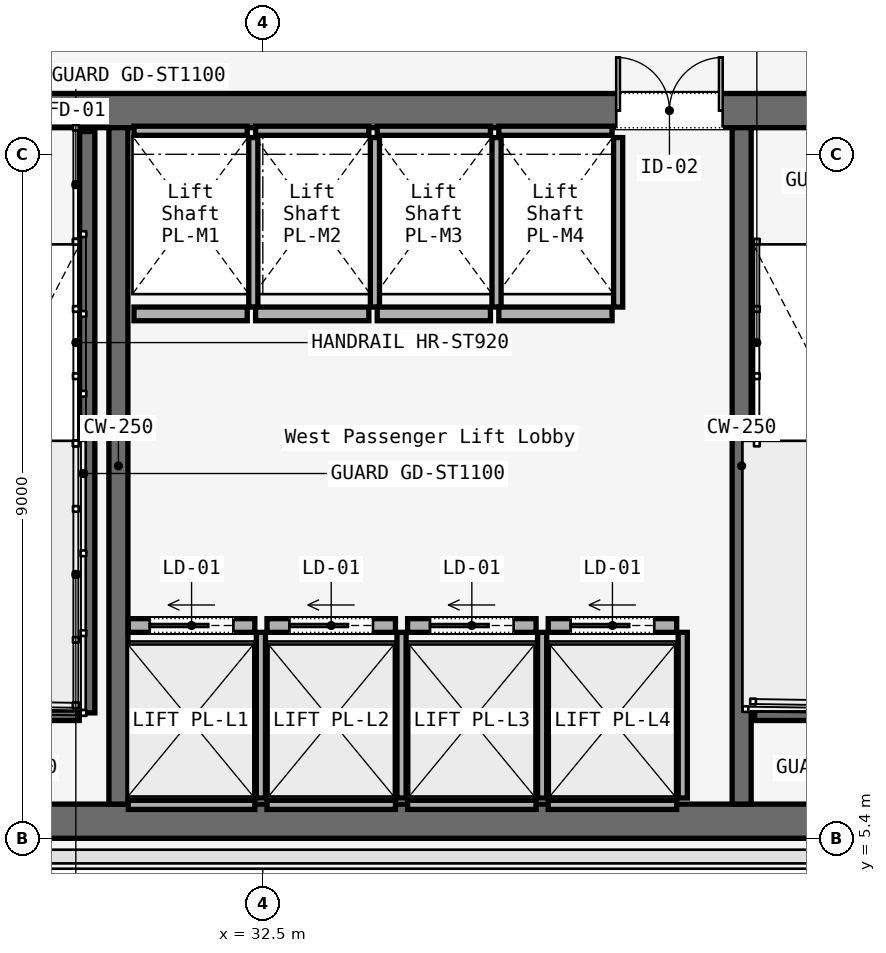
"""IFC4 building model, lengths in metres.
Left out: names, types, materials, properties, quantities, classifications, styles, units other than length and angle.
Written with IfcOpenShell. Run it as: python <this file> out.ifc"""

import sys

from ifc_helpers import new_model, si_unit, direction, frame, frame_2d, origin, place, context, subcontext, project, spatial, rectangle, extrude, element, fill, save


model = new_model("IFC4")
c1 = context("Model", 3, precision=1e-05, world=origin(), true_north=direction((0.0, 1.0)))
c2 = subcontext(c1, "Body", "Model", "MODEL_VIEW")
j1 = project(units=[si_unit("LENGTHUNIT", "METRE"), si_unit("PLANEANGLEUNIT", "RADIAN")], contexts=[c1])
p1 = place(None, origin())
s1 = spatial("IfcSite", under=j1, at=p1, CompositionType="ELEMENT")
p2 = place(p1, origin())
s2 = spatial("IfcBuilding", under=s1, at=p2, CompositionType="ELEMENT")
p3 = place(p2, frame((0.0, 0.0, 62.6)))
s3 = spatial("IfcBuildingStorey", under=s2, at=p3, CompositionType="ELEMENT", Elevation=62.6)
p4 = place(p3, frame((26.45, 14.975, 0.0), z_axis=(0.0, 0.0, 1.0), x_axis=(1.0, 0.0, 0.0)))
e1 = element("IfcWall", 1, at=p4, inside=s3, PredefinedType="SOLIDWALL", context=c2, shape_type="SweptSolid", body=[
    extrude(rectangle(XDim=31.1, YDim=0.45, at=frame_2d((15.55, 0.0))), origin(), (0.0, 0.0, 1.0), 3.58),
])
p5 = place(p4, frame((1.65, 0.0, 0.0)))
e2 = element("IfcOpeningElement", 2, at=p5, cuts=e1, PredefinedType="OPENING", context=c2, shape_type="SweptSolid", body=[
    extrude(rectangle(XDim=1.1, YDim=2.2, at=frame_2d((0.55, 1.1))), frame((0.0, 0.225, 0.0), z_axis=(0.0, -1.0, 0.0), x_axis=(1.0, 0.0, 0.0)), (0.0, 0.0, 1.0), 0.45),
])
p6 = place(p4, frame((13.65, 0.0, 0.0)))
e3 = element("IfcOpeningElement", 3, at=p6, cuts=e1, PredefinedType="OPENING", context=c2, shape_type="SweptSolid", body=[
    extrude(rectangle(XDim=1.1, YDim=2.2, at=frame_2d((0.55, 1.1))), frame((0.0, 0.225, 0.0), z_axis=(0.0, -1.0, 0.0), x_axis=(1.0, 0.0, 0.0)), (0.0, 0.0, 1.0), 0.45),
])
p7 = place(p4, frame((25.55, 0.0, 0.0)))
e4 = element("IfcOpeningElement", 4, at=p7, cuts=e1, PredefinedType="OPENING", context=c2, shape_type="SweptSolid", body=[
    extrude(rectangle(XDim=1.1, YDim=2.2, at=frame_2d((0.55, 1.1))), frame((0.0, 0.225, 0.0), z_axis=(0.0, -1.0, 0.0), x_axis=(1.0, 0.0, 0.0)), (0.0, 0.0, 1.0), 0.45),
])
p8 = place(p4, frame((10.7, 0.0, 0.0)))
e5 = element("IfcOpeningElement", 5, at=p8, cuts=e1, PredefinedType="OPENING", context=c2, shape_type="SweptSolid", body=[
    extrude(rectangle(XDim=1.4, YDim=2.2, at=frame_2d((0.7, 1.1))), frame((0.0, 0.225, 0.0), z_axis=(0.0, -1.0, 0.0), x_axis=(1.0, 0.0, 0.0)), (0.0, 0.0, 1.0), 0.45),
])
p9 = place(p4, frame((19.35, 0.0, 0.0)))
e6 = element("IfcOpeningElement", 6, at=p9, cuts=e1, PredefinedType="OPENING", context=c2, shape_type="SweptSolid", body=[
    extrude(rectangle(XDim=1.1, YDim=2.2, at=frame_2d((0.55, 1.1))), frame((0.0, 0.225, 0.0), z_axis=(0.0, -1.0, 0.0), x_axis=(1.0, 0.0, 0.0)), (0.0, 0.0, 1.0), 0.45),
])
p10 = place(p4, frame((21.4, 0.0, 0.0)))
e7 = element("IfcOpeningElement", 7, at=p10, cuts=e1, PredefinedType="OPENING", context=c2, shape_type="SweptSolid", body=[
    extrude(rectangle(XDim=0.9, YDim=2.1, at=frame_2d((0.45, 1.05))), frame((0.0, 0.225, 0.0), z_axis=(0.0, -1.0, 0.0), x_axis=(1.0, 0.0, 0.0)), (0.0, 0.0, 1.0), 0.45),
])
p11 = place(p4, frame((23.35, 0.0, 0.0)))
e8 = element("IfcOpeningElement", 8, at=p11, cuts=e1, PredefinedType="OPENING", context=c2, shape_type="SweptSolid", body=[
    extrude(rectangle(XDim=1.3, YDim=2.3, at=frame_2d((0.65, 1.15))), frame((0.0, 0.225, 0.0), z_axis=(0.0, -1.0, 0.0), x_axis=(1.0, 0.0, 0.0)), (0.0, 0.0, 1.0), 0.45),
])
p12 = place(p3, frame((26.45, 5.625, 0.0), z_axis=(0.0, 0.0, 1.0), x_axis=(1.0, 0.0, 0.0)))
e9 = element("IfcWall", 9, at=p12, inside=s3, PredefinedType="SOLIDWALL", context=c2, shape_type="SweptSolid", body=[
    extrude(rectangle(XDim=31.1, YDim=0.45, at=frame_2d((15.55, 0.0))), origin(), (0.0, 0.0, 1.0), 3.58),
])
for number, where, z_axis, x_axis in (
    (10, (30.6, 5.85, 0.0), (0.0, 0.0, 1.0), (0.0, 1.0, 0.0)),
    (11, (38.8, 5.85, 0.0), (0.0, 0.0, 1.0), (0.0, 1.0, 0.0)),
):
    element("IfcWall", number, at=place(p3, frame(where, z_axis=z_axis, x_axis=x_axis)), inside=s3, PredefinedType="SOLIDWALL", context=c2, shape_type="SweptSolid", body=[
        extrude(rectangle(XDim=8.9, YDim=0.25, at=frame_2d((4.45, 0.0))), origin(), (0.0, 0.0, 1.0), 3.58),
    ])
p13 = place(p3, frame((30.19, 14.7, 0.0), z_axis=(0.0, 0.0, 1.0), x_axis=(0.0, -1.0, 0.0)))
e12 = element("IfcWall", 12, at=p13, inside=s3, PredefinedType="SOLIDWALL", context=c2, shape_type="SweptSolid", body=[
    extrude(rectangle(XDim=7.65, YDim=0.2, at=frame_2d((3.825, 0.0))), origin(), (0.0, 0.0, 1.0), 3.8),
])
for number, where, z_axis, x_axis in (
    (13, (26.97, 7.05, 0.0), (0.0, 0.0, 1.0), (1.0, 0.0, 0.0)),
    (14, (38.97, 7.05, 0.0), (0.0, 0.0, 1.0), (1.0, 0.0, 0.0)),
):
    element("IfcWall", number, at=place(p3, frame(where, z_axis=z_axis, x_axis=x_axis)), inside=s3, PredefinedType="SOLIDWALL", context=c2, shape_type="SweptSolid", body=[
        extrude(rectangle(XDim=3.115, YDim=0.2, at=frame_2d((1.558, 0.0))), origin(), (0.0, 0.0, 1.0), 3.8),
    ])
p14 = place(p3, frame((30.73, 8.2, 0.0), z_axis=(0.0, 0.0, 1.0), x_axis=(1.0, 0.0, 0.0)))
e15 = element("IfcWall", 15, at=p14, inside=s3, PredefinedType="SOLIDWALL", context=c2, shape_type="SweptSolid", body=[
    extrude(rectangle(XDim=1.665, YDim=0.18, at=frame_2d((0.833, 0.0))), origin(), (0.0, 0.0, 1.0), 2.933),
])
p15 = place(p14, frame((0.282, 0.0, 0.0)))
e16 = element("IfcOpeningElement", 16, at=p15, cuts=e15, PredefinedType="OPENING", context=c2, shape_type="SweptSolid", body=[
    extrude(rectangle(XDim=1.1, YDim=2.2, at=frame_2d((0.55, 1.1))), frame((0.0, 0.09, 0.0), z_axis=(0.0, -1.0, 0.0), x_axis=(1.0, 0.0, 0.0)), (0.0, 0.0, 1.0), 0.18),
])
p16 = place(p3, frame((30.73, 5.84, 0.0), z_axis=(0.0, 0.0, 1.0), x_axis=(1.0, 0.0, 0.0)))
e17 = element("IfcWall", 17, at=p16, inside=s3, PredefinedType="SOLIDWALL", context=c2, shape_type="SweptSolid", body=[
    extrude(rectangle(XDim=1.665, YDim=0.12, at=frame_2d((0.833, 0.0))), origin(), (0.0, 0.0, 1.0), 2.933),
])
p17 = place(p3, frame((32.475, 5.93, 0.0), z_axis=(0.0, 0.0, 1.0), x_axis=(0.0, 1.0, 0.0)))
e18 = element("IfcWall", 18, at=p17, inside=s3, PredefinedType="SOLIDWALL", context=c2, shape_type="SweptSolid", body=[
    extrude(rectangle(XDim=2.18, YDim=0.12, at=frame_2d((1.09, 0.0))), origin(), (0.0, 0.0, 1.0), 2.933),
])
p18 = place(p3, frame((32.555, 8.2, 0.0), z_axis=(0.0, 0.0, 1.0), x_axis=(1.0, 0.0, 0.0)))
e19 = element("IfcWall", 19, at=p18, inside=s3, PredefinedType="SOLIDWALL", context=c2, shape_type="SweptSolid", body=[
    extrude(rectangle(XDim=1.69, YDim=0.18, at=frame_2d((0.845, 0.0))), origin(), (0.0, 0.0, 1.0), 2.933),
])
p19 = place(p18, frame((0.295, 0.0, 0.0)))
e20 = element("IfcOpeningElement", 20, at=p19, cuts=e19, PredefinedType="OPENING", context=c2, shape_type="SweptSolid", body=[
    extrude(rectangle(XDim=1.1, YDim=2.2, at=frame_2d((0.55, 1.1))), frame((0.0, 0.09, 0.0), z_axis=(0.0, -1.0, 0.0), x_axis=(1.0, 0.0, 0.0)), (0.0, 0.0, 1.0), 0.18),
])
p20 = place(p3, frame((32.555, 5.84, 0.0), z_axis=(0.0, 0.0, 1.0), x_axis=(1.0, 0.0, 0.0)))
e21 = element("IfcWall", 21, at=p20, inside=s3, PredefinedType="SOLIDWALL", context=c2, shape_type="SweptSolid", body=[
    extrude(rectangle(XDim=1.69, YDim=0.12, at=frame_2d((0.845, 0.0))), origin(), (0.0, 0.0, 1.0), 2.933),
])
p21 = place(p3, frame((34.325, 5.93, 0.0), z_axis=(0.0, 0.0, 1.0), x_axis=(0.0, 1.0, 0.0)))
e22 = element("IfcWall", 22, at=p21, inside=s3, PredefinedType="SOLIDWALL", context=c2, shape_type="SweptSolid", body=[
    extrude(rectangle(XDim=2.18, YDim=0.12, at=frame_2d((1.09, 0.0))), origin(), (0.0, 0.0, 1.0), 2.933),
])
p22 = place(p3, frame((34.405, 8.2, 0.0), z_axis=(0.0, 0.0, 1.0), x_axis=(1.0, 0.0, 0.0)))
e23 = element("IfcWall", 23, at=p22, inside=s3, PredefinedType="SOLIDWALL", context=c2, shape_type="SweptSolid", body=[
    extrude(rectangle(XDim=1.69, YDim=0.18, at=frame_2d((0.845, 0.0))), origin(), (0.0, 0.0, 1.0), 2.933),
])
p23 = place(p22, frame((0.295, 0.0, 0.0)))
e24 = element("IfcOpeningElement", 24, at=p23, cuts=e23, PredefinedType="OPENING", context=c2, shape_type="SweptSolid", body=[
    extrude(rectangle(XDim=1.1, YDim=2.2, at=frame_2d((0.55, 1.1))), frame((0.0, 0.09, 0.0), z_axis=(0.0, -1.0, 0.0), x_axis=(1.0, 0.0, 0.0)), (0.0, 0.0, 1.0), 0.18),
])
p24 = place(p3, frame((34.405, 5.84, 0.0), z_axis=(0.0, 0.0, 1.0), x_axis=(1.0, 0.0, 0.0)))
e25 = element("IfcWall", 25, at=p24, inside=s3, PredefinedType="SOLIDWALL", context=c2, shape_type="SweptSolid", body=[
    extrude(rectangle(XDim=1.69, YDim=0.12, at=frame_2d((0.845, 0.0))), origin(), (0.0, 0.0, 1.0), 2.933),
])
p25 = place(p3, frame((36.175, 5.93, 0.0), z_axis=(0.0, 0.0, 1.0), x_axis=(0.0, 1.0, 0.0)))
e26 = element("IfcWall", 26, at=p25, inside=s3, PredefinedType="SOLIDWALL", context=c2, shape_type="SweptSolid", body=[
    extrude(rectangle(XDim=2.18, YDim=0.12, at=frame_2d((1.09, 0.0))), origin(), (0.0, 0.0, 1.0), 2.933),
])
p26 = place(p3, frame((36.255, 8.2, 0.0), z_axis=(0.0, 0.0, 1.0), x_axis=(1.0, 0.0, 0.0)))
e27 = element("IfcWall", 27, at=p26, inside=s3, PredefinedType="SOLIDWALL", context=c2, shape_type="SweptSolid", body=[
    extrude(rectangle(XDim=1.69, YDim=0.18, at=frame_2d((0.845, 0.0))), origin(), (0.0, 0.0, 1.0), 2.933),
])
p27 = place(p26, frame((0.295, 0.0, 0.0)))
e28 = element("IfcOpeningElement", 28, at=p27, cuts=e27, PredefinedType="OPENING", context=c2, shape_type="SweptSolid", body=[
    extrude(rectangle(XDim=1.1, YDim=2.2, at=frame_2d((0.55, 1.1))), frame((0.0, 0.09, 0.0), z_axis=(0.0, -1.0, 0.0), x_axis=(1.0, 0.0, 0.0)), (0.0, 0.0, 1.0), 0.18),
])
p28 = place(p3, frame((36.255, 5.84, 0.0), z_axis=(0.0, 0.0, 1.0), x_axis=(1.0, 0.0, 0.0)))
e29 = element("IfcWall", 29, at=p28, inside=s3, PredefinedType="SOLIDWALL", context=c2, shape_type="SweptSolid", body=[
    extrude(rectangle(XDim=1.69, YDim=0.12, at=frame_2d((0.845, 0.0))), origin(), (0.0, 0.0, 1.0), 2.933),
])
p29 = place(p3, frame((38.025, 5.93, 0.0), z_axis=(0.0, 0.0, 1.0), x_axis=(0.0, 1.0, 0.0)))
e30 = element("IfcWall", 30, at=p29, inside=s3, PredefinedType="SOLIDWALL", context=c2, shape_type="SweptSolid", body=[
    extrude(rectangle(XDim=2.18, YDim=0.12, at=frame_2d((1.09, 0.0))), origin(), (0.0, 0.0, 1.0), 2.933),
])
p30 = place(p3, frame((30.805, 12.3, 0.0), z_axis=(0.0, 0.0, 1.0), x_axis=(1.0, 0.0, 0.0)))
e31 = element("IfcWall", 31, at=p30, inside=s3, PredefinedType="SOLIDWALL", context=c2, shape_type="SweptSolid", body=[
    extrude(rectangle(XDim=1.49, YDim=0.18, at=frame_2d((0.745, 0.0))), origin(), (0.0, 0.0, 1.0), 2.933),
])
p31 = place(p3, frame((30.805, 14.71, 0.0), z_axis=(0.0, 0.0, 1.0), x_axis=(1.0, 0.0, 0.0)))
e32 = element("IfcWall", 32, at=p31, inside=s3, PredefinedType="SOLIDWALL", context=c2, shape_type="SweptSolid", body=[
    extrude(rectangle(XDim=1.49, YDim=0.12, at=frame_2d((0.745, 0.0))), origin(), (0.0, 0.0, 1.0), 2.933),
])
p32 = place(p3, frame((32.375, 12.39, 0.0), z_axis=(0.0, 0.0, 1.0), x_axis=(0.0, 1.0, 0.0)))
e33 = element("IfcWall", 33, at=p32, inside=s3, PredefinedType="SOLIDWALL", context=c2, shape_type="SweptSolid", body=[
    extrude(rectangle(XDim=2.23, YDim=0.12, at=frame_2d((1.115, 0.0))), origin(), (0.0, 0.0, 1.0), 2.933),
])
p33 = place(p3, frame((32.405, 12.3, 0.0), z_axis=(0.0, 0.0, 1.0), x_axis=(1.0, 0.0, 0.0)))
e34 = element("IfcWall", 34, at=p33, inside=s3, PredefinedType="SOLIDWALL", context=c2, shape_type="SweptSolid", body=[
    extrude(rectangle(XDim=1.49, YDim=0.18, at=frame_2d((0.745, 0.0))), origin(), (0.0, 0.0, 1.0), 2.933),
])
p34 = place(p3, frame((32.405, 14.71, 0.0), z_axis=(0.0, 0.0, 1.0), x_axis=(1.0, 0.0, 0.0)))
e35 = element("IfcWall", 35, at=p34, inside=s3, PredefinedType="SOLIDWALL", context=c2, shape_type="SweptSolid", body=[
    extrude(rectangle(XDim=1.49, YDim=0.12, at=frame_2d((0.745, 0.0))), origin(), (0.0, 0.0, 1.0), 2.933),
])
p35 = place(p3, frame((33.975, 12.39, 0.0), z_axis=(0.0, 0.0, 1.0), x_axis=(0.0, 1.0, 0.0)))
e36 = element("IfcWall", 36, at=p35, inside=s3, PredefinedType="SOLIDWALL", context=c2, shape_type="SweptSolid", body=[
    extrude(rectangle(XDim=2.23, YDim=0.12, at=frame_2d((1.115, 0.0))), origin(), (0.0, 0.0, 1.0), 2.933),
])
p36 = place(p3, frame((34.005, 12.3, 0.0), z_axis=(0.0, 0.0, 1.0), x_axis=(1.0, 0.0, 0.0)))
e37 = element("IfcWall", 37, at=p36, inside=s3, PredefinedType="SOLIDWALL", context=c2, shape_type="SweptSolid", body=[
    extrude(rectangle(XDim=1.49, YDim=0.18, at=frame_2d((0.745, 0.0))), origin(), (0.0, 0.0, 1.0), 2.933),
])
p37 = place(p3, frame((34.005, 14.71, 0.0), z_axis=(0.0, 0.0, 1.0), x_axis=(1.0, 0.0, 0.0)))
e38 = element("IfcWall", 38, at=p37, inside=s3, PredefinedType="SOLIDWALL", context=c2, shape_type="SweptSolid", body=[
    extrude(rectangle(XDim=1.49, YDim=0.12, at=frame_2d((0.745, 0.0))), origin(), (0.0, 0.0, 1.0), 2.933),
])
p38 = place(p3, frame((35.575, 12.39, 0.0), z_axis=(0.0, 0.0, 1.0), x_axis=(0.0, 1.0, 0.0)))
e39 = element("IfcWall", 39, at=p38, inside=s3, PredefinedType="SOLIDWALL", context=c2, shape_type="SweptSolid", body=[
    extrude(rectangle(XDim=2.23, YDim=0.12, at=frame_2d((1.115, 0.0))), origin(), (0.0, 0.0, 1.0), 2.933),
])
p39 = place(p3, frame((35.605, 12.3, 0.0), z_axis=(0.0, 0.0, 1.0), x_axis=(1.0, 0.0, 0.0)))
e40 = element("IfcWall", 40, at=p39, inside=s3, PredefinedType="SOLIDWALL", context=c2, shape_type="SweptSolid", body=[
    extrude(rectangle(XDim=1.49, YDim=0.18, at=frame_2d((0.745, 0.0))), origin(), (0.0, 0.0, 1.0), 2.933),
])
p40 = place(p3, frame((35.605, 14.71, 0.0), z_axis=(0.0, 0.0, 1.0), x_axis=(1.0, 0.0, 0.0)))
e41 = element("IfcWall", 41, at=p40, inside=s3, PredefinedType="SOLIDWALL", context=c2, shape_type="SweptSolid", body=[
    extrude(rectangle(XDim=1.49, YDim=0.12, at=frame_2d((0.745, 0.0))), origin(), (0.0, 0.0, 1.0), 2.933),
])
p41 = place(p3, frame((37.175, 12.39, 0.0), z_axis=(0.0, 0.0, 1.0), x_axis=(0.0, 1.0, 0.0)))
e42 = element("IfcWall", 42, at=p41, inside=s3, PredefinedType="SOLIDWALL", context=c2, shape_type="SweptSolid", body=[
    extrude(rectangle(XDim=2.23, YDim=0.12, at=frame_2d((1.115, 0.0))), origin(), (0.0, 0.0, 1.0), 2.933),
])
p42 = place(p8, origin())
e43 = element("IfcDoor", 43, at=p42, inside=s3, OperationType="DOUBLE_DOOR_SINGLE_SWING", PredefinedType="DOOR", context=c2, shape_type="SweptSolid", body=[
    extrude(rectangle(XDim=1.4, YDim=2.2, at=frame_2d((0.7, 1.1))), frame((0.0, 0.025, 0.0), z_axis=(0.0, -1.0, 0.0), x_axis=(1.0, 0.0, 0.0)), (0.0, 0.0, 1.0), 0.05),
])
fill(e5, e43)
p43 = place(p15, origin())
e44 = element("IfcDoor", 44, at=p43, inside=s3, OperationType="SLIDING_TO_LEFT", PredefinedType="DOOR", context=c2, shape_type="SweptSolid", body=[
    extrude(rectangle(XDim=1.1, YDim=2.2, at=frame_2d((0.55, 1.1))), frame((0.0, 0.025, 0.0), z_axis=(0.0, -1.0, 0.0), x_axis=(1.0, 0.0, 0.0)), (0.0, 0.0, 1.0), 0.05),
])
fill(e16, e44)
p44 = place(p19, origin())
e45 = element("IfcDoor", 45, at=p44, inside=s3, OperationType="SLIDING_TO_LEFT", PredefinedType="DOOR", context=c2, shape_type="SweptSolid", body=[
    extrude(rectangle(XDim=1.1, YDim=2.2, at=frame_2d((0.55, 1.1))), frame((0.0, 0.025, 0.0), z_axis=(0.0, -1.0, 0.0), x_axis=(1.0, 0.0, 0.0)), (0.0, 0.0, 1.0), 0.05),
])
fill(e20, e45)
p45 = place(p23, origin())
e46 = element("IfcDoor", 46, at=p45, inside=s3, OperationType="SLIDING_TO_LEFT", PredefinedType="DOOR", context=c2, shape_type="SweptSolid", body=[
    extrude(rectangle(XDim=1.1, YDim=2.2, at=frame_2d((0.55, 1.1))), frame((0.0, 0.025, 0.0), z_axis=(0.0, -1.0, 0.0), x_axis=(1.0, 0.0, 0.0)), (0.0, 0.0, 1.0), 0.05),
])
fill(e24, e46)
p46 = place(p27, origin())
e47 = element("IfcDoor", 47, at=p46, inside=s3, OperationType="SLIDING_TO_LEFT", PredefinedType="DOOR", context=c2, shape_type="SweptSolid", body=[
    extrude(rectangle(XDim=1.1, YDim=2.2, at=frame_2d((0.55, 1.1))), frame((0.0, 0.025, 0.0), z_axis=(0.0, -1.0, 0.0), x_axis=(1.0, 0.0, 0.0)), (0.0, 0.0, 1.0), 0.05),
])
fill(e28, e47)
save(model, sys.argv[1])
